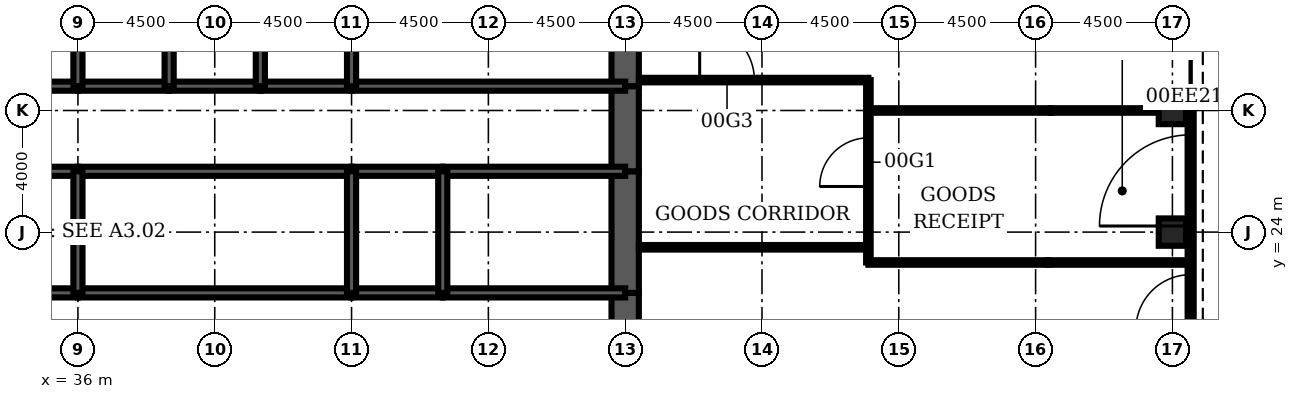
"""IFC4 building model, lengths in metres.
Left out: names, types, materials, properties, quantities, classifications, styles, units other than length and angle.
Written with IfcOpenShell. Run it as: python <this file> out.ifc"""

import sys

from ifc_helpers import new_model, si_unit, direction, frame, frame_2d, origin, origin_2d, place, context, subcontext, project, spatial, rectangle, hollow_rectangle, extrude, element, fill, save


model = new_model("IFC4")
c1 = context("Model", 3, precision=1e-05, world=origin(), true_north=direction((0.0, 1.0)))
c2 = subcontext(c1, "Body", "Model", "MODEL_VIEW")
j1 = project(units=[si_unit("LENGTHUNIT", "METRE"), si_unit("PLANEANGLEUNIT", "RADIAN")], contexts=[c1])
p1 = place(None, origin())
s1 = spatial("IfcSite", under=j1, at=p1, CompositionType="ELEMENT")
p2 = place(p1, origin())
s2 = spatial("IfcBuilding", under=s1, at=p2, CompositionType="ELEMENT")
p3 = place(p2, origin())
s3 = spatial("IfcBuildingStorey", under=s2, at=p3, CompositionType="ELEMENT", Elevation=0.0)
for number, where, z_axis, x_axis in (
    (1, (72.0, 24.0, 0.0), (0.0, 0.0, 1.0), (1.0, 0.0, 0.0)),
    (2, (72.0, 28.0, 0.0), (0.0, 0.0, 1.0), (1.0, 0.0, 0.0)),
):
    element("IfcColumn", number, at=place(p3, frame(where, z_axis=z_axis, x_axis=x_axis)), inside=s3, PredefinedType="COLUMN", context=c2, shape_type="SweptSolid", body=[
        extrude(hollow_rectangle(XDim=0.9, YDim=0.9, WallThickness=0.12, at=origin_2d()), origin(), (0.0, 0.0, 1.0), 6.0),
    ])
p4 = place(p3, frame((54.0, 19.2, 0.0), z_axis=(0.0, 0.0, 1.0), x_axis=(0.0, 1.0, 0.0)))
e3 = element("IfcWall", 3, at=p4, inside=s3, PredefinedType="SHEAR", context=c2, shape_type="SweptSolid", body=[
    extrude(rectangle(XDim=2.8, YDim=0.9, at=frame_2d((1.4, 0.0))), origin(), (0.0, 0.0, 1.0), 6.0),
])
p5 = place(p4, frame((0.4, 0.0, 0.0)))
e4 = element("IfcOpeningElement", 4, at=p5, cuts=e3, PredefinedType="OPENING", context=c2, shape_type="SweptSolid", body=[
    extrude(rectangle(XDim=1.8, YDim=2.1, at=frame_2d((0.9, 1.05))), frame((0.0, 0.46, 0.0), z_axis=(0.0, -1.0, 0.0), x_axis=(1.0, 0.0, 0.0)), (0.0, 0.0, 1.0), 0.92),
])
p6 = place(p3, frame((54.0, 22.0, 0.0), z_axis=(0.0, 0.0, 1.0), x_axis=(0.0, 1.0, 0.0)))
e5 = element("IfcWall", 5, at=p6, inside=s3, PredefinedType="SHEAR", context=c2, shape_type="SweptSolid", body=[
    extrude(rectangle(XDim=4.0, YDim=0.9, at=frame_2d((2.0, 0.0))), origin(), (0.0, 0.0, 1.0), 6.0),
])
p7 = place(p3, frame((54.0, 26.0, 0.0), z_axis=(0.0, 0.0, 1.0), x_axis=(0.0, 1.0, 0.0)))
e6 = element("IfcWall", 6, at=p7, inside=s3, PredefinedType="SHEAR", context=c2, shape_type="SweptSolid", body=[
    extrude(rectangle(XDim=2.8, YDim=0.9, at=frame_2d((1.4, 0.0))), origin(), (0.0, 0.0, 1.0), 6.0),
])
p8 = place(p7, frame((0.6, 0.0, 0.0)))
e7 = element("IfcOpeningElement", 7, at=p8, cuts=e6, PredefinedType="OPENING", context=c2, shape_type="SweptSolid", body=[
    extrude(rectangle(XDim=1.8, YDim=2.1, at=frame_2d((0.9, 1.05))), frame((0.0, 0.46, 0.0), z_axis=(0.0, -1.0, 0.0), x_axis=(1.0, 0.0, 0.0)), (0.0, 0.0, 1.0), 0.92),
])
p9 = place(p3, frame((54.0, 28.8, 0.0), z_axis=(0.0, 0.0, 1.0), x_axis=(0.0, 1.0, 0.0)))
e8 = element("IfcWall", 8, at=p9, inside=s3, PredefinedType="SHEAR", context=c2, shape_type="SweptSolid", body=[
    extrude(rectangle(XDim=3.2, YDim=0.9, at=frame_2d((1.6, 0.0))), origin(), (0.0, 0.0, 1.0), 6.0),
])
p10 = place(p3, frame((33.0, 28.8, 0.0), z_axis=(0.0, 0.0, 1.0), x_axis=(1.0, 0.0, 0.0)))
e9 = element("IfcWall", 9, at=p10, inside=s3, PredefinedType="SOLIDWALL", context=c2, shape_type="SweptSolid", body=[
    extrude(rectangle(XDim=3.0, YDim=0.3, at=frame_2d((1.5, 0.0))), origin(), (0.0, 0.0, 1.0), 6.0),
])
p11 = place(p10, frame((0.95, 0.0, 0.0)))
e10 = element("IfcOpeningElement", 10, at=p11, cuts=e9, PredefinedType="OPENING", context=c2, shape_type="SweptSolid", body=[
    extrude(rectangle(XDim=1.1, YDim=2.2, at=frame_2d((0.55, 1.1))), frame((0.0, 0.16, 0.0), z_axis=(0.0, -1.0, 0.0), x_axis=(1.0, 0.0, 0.0)), (0.0, 0.0, 1.0), 0.32),
])
p12 = place(p3, frame((36.0, 28.8, 0.0), z_axis=(0.0, 0.0, 1.0), x_axis=(1.0, 0.0, 0.0)))
e11 = element("IfcWall", 11, at=p12, inside=s3, PredefinedType="SOLIDWALL", context=c2, shape_type="SweptSolid", body=[
    extrude(rectangle(XDim=3.0, YDim=0.3, at=frame_2d((1.5, 0.0))), origin(), (0.0, 0.0, 1.0), 6.0),
])
p13 = place(p12, frame((0.95, 0.0, 0.0)))
e12 = element("IfcOpeningElement", 12, at=p13, cuts=e11, PredefinedType="OPENING", context=c2, shape_type="SweptSolid", body=[
    extrude(rectangle(XDim=1.1, YDim=2.2, at=frame_2d((0.55, 1.1))), frame((0.0, 0.16, 0.0), z_axis=(0.0, -1.0, 0.0), x_axis=(1.0, 0.0, 0.0)), (0.0, 0.0, 1.0), 0.32),
])
p14 = place(p3, frame((39.0, 28.8, 0.0), z_axis=(0.0, 0.0, 1.0), x_axis=(1.0, 0.0, 0.0)))
e13 = element("IfcWall", 13, at=p14, inside=s3, PredefinedType="SOLIDWALL", context=c2, shape_type="SweptSolid", body=[
    extrude(rectangle(XDim=3.0, YDim=0.3, at=frame_2d((1.5, 0.0))), origin(), (0.0, 0.0, 1.0), 6.0),
])
p15 = place(p14, frame((0.95, 0.0, 0.0)))
e14 = element("IfcOpeningElement", 14, at=p15, cuts=e13, PredefinedType="OPENING", context=c2, shape_type="SweptSolid", body=[
    extrude(rectangle(XDim=1.1, YDim=2.2, at=frame_2d((0.55, 1.1))), frame((0.0, 0.16, 0.0), z_axis=(0.0, -1.0, 0.0), x_axis=(1.0, 0.0, 0.0)), (0.0, 0.0, 1.0), 0.32),
])
p16 = place(p3, frame((42.0, 28.8, 0.0), z_axis=(0.0, 0.0, 1.0), x_axis=(1.0, 0.0, 0.0)))
e15 = element("IfcWall", 15, at=p16, inside=s3, PredefinedType="SOLIDWALL", context=c2, shape_type="SweptSolid", body=[
    extrude(rectangle(XDim=3.0, YDim=0.3, at=frame_2d((1.5, 0.0))), origin(), (0.0, 0.0, 1.0), 6.0),
])
p17 = place(p16, frame((0.95, 0.0, 0.0)))
e16 = element("IfcOpeningElement", 16, at=p17, cuts=e15, PredefinedType="OPENING", context=c2, shape_type="SweptSolid", body=[
    extrude(rectangle(XDim=1.1, YDim=2.2, at=frame_2d((0.55, 1.1))), frame((0.0, 0.16, 0.0), z_axis=(0.0, -1.0, 0.0), x_axis=(1.0, 0.0, 0.0)), (0.0, 0.0, 1.0), 0.32),
])
p18 = place(p3, frame((45.0, 28.8, 0.0), z_axis=(0.0, 0.0, 1.0), x_axis=(1.0, 0.0, 0.0)))
e17 = element("IfcWall", 17, at=p18, inside=s3, PredefinedType="SOLIDWALL", context=c2, shape_type="SweptSolid", body=[
    extrude(rectangle(XDim=9.0, YDim=0.3, at=frame_2d((4.5, 0.0))), origin(), (0.0, 0.0, 1.0), 6.0),
])
p19 = place(p18, frame((7.35, 0.0, 0.0)))
e18 = element("IfcOpeningElement", 18, at=p19, cuts=e17, PredefinedType="OPENING", context=c2, shape_type="SweptSolid", body=[
    extrude(rectangle(XDim=1.0, YDim=2.1, at=frame_2d((0.5, 1.05))), frame((0.0, 0.16, 0.0), z_axis=(0.0, -1.0, 0.0), x_axis=(1.0, 0.0, 0.0)), (0.0, 0.0, 1.0), 0.32),
])
p20 = place(p3, frame((27.0, 22.0, 0.0), z_axis=(0.0, 0.0, 1.0), x_axis=(1.0, 0.0, 0.0)))
e19 = element("IfcWall", 19, at=p20, inside=s3, PredefinedType="SOLIDWALL", context=c2, shape_type="SweptSolid", body=[
    extrude(rectangle(XDim=9.0, YDim=0.3, at=frame_2d((4.5, 0.0))), origin(), (0.0, 0.0, 1.0), 6.0),
])
p21 = place(p20, frame((4.0, 0.0, 0.0)))
e20 = element("IfcOpeningElement", 20, at=p21, cuts=e19, PredefinedType="OPENING", context=c2, shape_type="SweptSolid", body=[
    extrude(rectangle(XDim=1.0, YDim=2.1, at=frame_2d((0.5, 1.05))), frame((0.0, 0.16, 0.0), z_axis=(0.0, -1.0, 0.0), x_axis=(1.0, 0.0, 0.0)), (0.0, 0.0, 1.0), 0.32),
])
p22 = place(p3, frame((36.0, 22.0, 0.0), z_axis=(0.0, 0.0, 1.0), x_axis=(1.0, 0.0, 0.0)))
e21 = element("IfcWall", 21, at=p22, inside=s3, PredefinedType="SOLIDWALL", context=c2, shape_type="SweptSolid", body=[
    extrude(rectangle(XDim=9.0, YDim=0.3, at=frame_2d((4.5, 0.0))), origin(), (0.0, 0.0, 1.0), 6.0),
])
p23 = place(p22, frame((4.0, 0.0, 0.0)))
e22 = element("IfcOpeningElement", 22, at=p23, cuts=e21, PredefinedType="OPENING", context=c2, shape_type="SweptSolid", body=[
    extrude(rectangle(XDim=1.0, YDim=2.1, at=frame_2d((0.5, 1.05))), frame((0.0, 0.16, 0.0), z_axis=(0.0, -1.0, 0.0), x_axis=(1.0, 0.0, 0.0)), (0.0, 0.0, 1.0), 0.32),
])
p24 = place(p3, frame((45.0, 22.0, 0.0), z_axis=(0.0, 0.0, 1.0), x_axis=(1.0, 0.0, 0.0)))
e23 = element("IfcWall", 23, at=p24, inside=s3, PredefinedType="SOLIDWALL", context=c2, shape_type="SweptSolid", body=[
    extrude(rectangle(XDim=3.0, YDim=0.3, at=frame_2d((1.5, 0.0))), origin(), (0.0, 0.0, 1.0), 6.0),
])
p25 = place(p24, frame((1.0, 0.0, 0.0)))
e24 = element("IfcOpeningElement", 24, at=p25, cuts=e23, PredefinedType="OPENING", context=c2, shape_type="SweptSolid", body=[
    extrude(rectangle(XDim=1.0, YDim=2.1, at=frame_2d((0.5, 1.05))), frame((0.0, 0.16, 0.0), z_axis=(0.0, -1.0, 0.0), x_axis=(1.0, 0.0, 0.0)), (0.0, 0.0, 1.0), 0.32),
])
p26 = place(p3, frame((48.0, 22.0, 0.0), z_axis=(0.0, 0.0, 1.0), x_axis=(1.0, 0.0, 0.0)))
e25 = element("IfcWall", 25, at=p26, inside=s3, PredefinedType="SOLIDWALL", context=c2, shape_type="SweptSolid", body=[
    extrude(rectangle(XDim=6.0, YDim=0.3, at=frame_2d((3.0, 0.0))), origin(), (0.0, 0.0, 1.0), 6.0),
])
p27 = place(p26, frame((2.0, 0.0, 0.0)))
e26 = element("IfcOpeningElement", 26, at=p27, cuts=e25, PredefinedType="OPENING", context=c2, shape_type="SweptSolid", body=[
    extrude(rectangle(XDim=1.0, YDim=2.1, at=frame_2d((0.5, 1.05))), frame((0.0, 0.16, 0.0), z_axis=(0.0, -1.0, 0.0), x_axis=(1.0, 0.0, 0.0)), (0.0, 0.0, 1.0), 0.32),
])
p28 = place(p26, frame((4.3, 0.0, 0.0)))
e27 = element("IfcOpeningElement", 27, at=p28, cuts=e25, PredefinedType="OPENING", context=c2, shape_type="SweptSolid", body=[
    extrude(rectangle(XDim=1.0, YDim=2.1, at=frame_2d((0.5, 1.05))), frame((0.0, 0.16, 0.0), z_axis=(0.0, -1.0, 0.0), x_axis=(1.0, 0.0, 0.0)), (0.0, 0.0, 1.0), 0.32),
])
for number, where, z_axis, x_axis in (
    (28, (27.0, 26.0, 0.0), (0.0, 0.0, 1.0), (1.0, 0.0, 0.0)),
    (29, (36.0, 26.0, 0.0), (0.0, 0.0, 1.0), (1.0, 0.0, 0.0)),
):
    element("IfcWall", number, at=place(p3, frame(where, z_axis=z_axis, x_axis=x_axis)), inside=s3, PredefinedType="SOLIDWALL", context=c2, shape_type="SweptSolid", body=[
        extrude(rectangle(XDim=9.0, YDim=0.3, at=frame_2d((4.5, 0.0))), origin(), (0.0, 0.0, 1.0), 6.0),
    ])
p29 = place(p3, frame((45.0, 26.0, 0.0), z_axis=(0.0, 0.0, 1.0), x_axis=(1.0, 0.0, 0.0)))
e30 = element("IfcWall", 30, at=p29, inside=s3, PredefinedType="SOLIDWALL", context=c2, shape_type="SweptSolid", body=[
    extrude(rectangle(XDim=3.0, YDim=0.3, at=frame_2d((1.5, 0.0))), origin(), (0.0, 0.0, 1.0), 6.0),
])
p30 = place(p3, frame((48.0, 26.0, 0.0), z_axis=(0.0, 0.0, 1.0), x_axis=(1.0, 0.0, 0.0)))
e31 = element("IfcWall", 31, at=p30, inside=s3, PredefinedType="SOLIDWALL", context=c2, shape_type="SweptSolid", body=[
    extrude(rectangle(XDim=6.0, YDim=0.3, at=frame_2d((3.0, 0.0))), origin(), (0.0, 0.0, 1.0), 6.0),
])
for number, where, z_axis, x_axis in (
    (32, (36.0, 28.8, 0.0), (0.0, 0.0, 1.0), (0.0, 1.0, 0.0)),
    (33, (39.0, 28.8, 0.0), (0.0, 0.0, 1.0), (0.0, 1.0, 0.0)),
    (34, (42.0, 28.8, 0.0), (0.0, 0.0, 1.0), (0.0, 1.0, 0.0)),
    (35, (45.0, 28.8, 0.0), (0.0, 0.0, 1.0), (0.0, 1.0, 0.0)),
):
    element("IfcWall", number, at=place(p3, frame(where, z_axis=z_axis, x_axis=x_axis)), inside=s3, PredefinedType="SOLIDWALL", context=c2, shape_type="SweptSolid", body=[
        extrude(rectangle(XDim=3.2, YDim=0.3, at=frame_2d((1.6, 0.0))), origin(), (0.0, 0.0, 1.0), 6.0),
    ])
for number, where, z_axis, x_axis in (
    (36, (36.0, 22.0, 0.0), (0.0, 0.0, 1.0), (0.0, 1.0, 0.0)),
    (37, (45.0, 22.0, 0.0), (0.0, 0.0, 1.0), (0.0, 1.0, 0.0)),
    (38, (48.0, 22.0, 0.0), (0.0, 0.0, 1.0), (0.0, 1.0, 0.0)),
):
    element("IfcWall", number, at=place(p3, frame(where, z_axis=z_axis, x_axis=x_axis)), inside=s3, PredefinedType="SOLIDWALL", context=c2, shape_type="SweptSolid", body=[
        extrude(rectangle(XDim=4.0, YDim=0.3, at=frame_2d((2.0, 0.0))), origin(), (0.0, 0.0, 1.0), 6.0),
    ])
p31 = place(p3, frame((39.0, 22.15, 0.0), z_axis=(0.0, 0.0, 1.0), x_axis=(0.0, 1.0, 0.0)))
e39 = element("IfcWall", 39, at=p31, inside=s3, PredefinedType="PARTITIONING", context=c2, shape_type="SweptSolid", body=[
    extrude(rectangle(XDim=3.7, YDim=0.15, at=frame_2d((1.85, 0.0))), origin(), (0.0, 0.0, 1.0), 3.0),
])
p32 = place(p31, frame((2.2, 0.0, 0.0)))
e40 = element("IfcOpeningElement", 40, at=p32, cuts=e39, PredefinedType="OPENING", context=c2, shape_type="SweptSolid", body=[
    extrude(rectangle(XDim=1.0, YDim=2.1, at=frame_2d((0.5, 1.05))), frame((0.0, 0.085, 0.0), z_axis=(0.0, -1.0, 0.0), x_axis=(1.0, 0.0, 0.0)), (0.0, 0.0, 1.0), 0.17),
])
p33 = place(p3, frame((51.975, 22.15, 0.0), z_axis=(0.0, 0.0, 1.0), x_axis=(0.0, 1.0, 0.0)))
e41 = element("IfcWall", 41, at=p33, inside=s3, PredefinedType="PARTITIONING", context=c2, shape_type="SweptSolid", body=[
    extrude(rectangle(XDim=3.7, YDim=0.15, at=frame_2d((1.85, 0.0))), origin(), (0.0, 0.0, 1.0), 3.0),
])
p34 = place(p3, frame((67.9, 23.0, 0.0), z_axis=(0.0, 0.0, 1.0), x_axis=(1.0, 0.0, 0.0)))
e42 = element("IfcWall", 42, at=p34, inside=s3, PredefinedType="PARTITIONING", context=c2, shape_type="SweptSolid", body=[
    extrude(rectangle(XDim=4.6, YDim=0.15, at=frame_2d((2.3, 0.0))), origin(), (0.0, 0.0, 1.0), 3.0),
])
p35 = place(p3, frame((68.0, 28.0, 0.0), z_axis=(0.0, 0.0, 1.0), x_axis=(1.0, 0.0, 0.0)))
e43 = element("IfcWall", 43, at=p35, inside=s3, PredefinedType="PARTITIONING", context=c2, shape_type="SweptSolid", body=[
    extrude(rectangle(XDim=4.5, YDim=0.15, at=frame_2d((2.25, 0.0))), origin(), (0.0, 0.0, 1.0), 3.0),
])
p36 = place(p3, frame((62.0, 23.0, 0.0), z_axis=(0.0, 0.0, 1.0), x_axis=(1.0, 0.0, 0.0)))
e44 = element("IfcWall", 44, at=p36, inside=s3, PredefinedType="PARTITIONING", context=c2, shape_type="SweptSolid", body=[
    extrude(rectangle(XDim=5.9, YDim=0.15, at=frame_2d((2.95, 0.0))), origin(), (0.0, 0.0, 1.0), 3.0),
])
p37 = place(p3, frame((62.0, 23.0, 0.0), z_axis=(0.0, 0.0, 1.0), x_axis=(0.0, 1.0, 0.0)))
e45 = element("IfcWall", 45, at=p37, inside=s3, PredefinedType="PARTITIONING", context=c2, shape_type="SweptSolid", body=[
    extrude(rectangle(XDim=6.0, YDim=0.15, at=frame_2d((3.0, 0.0))), origin(), (0.0, 0.0, 1.0), 3.0),
])
p38 = place(p37, frame((2.5, 0.0, 0.0)))
e46 = element("IfcOpeningElement", 46, at=p38, cuts=e45, PredefinedType="OPENING", context=c2, shape_type="SweptSolid", body=[
    extrude(rectangle(XDim=1.6, YDim=2.1, at=frame_2d((0.8, 1.05))), frame((0.0, 0.085, 0.0), z_axis=(0.0, -1.0, 0.0), x_axis=(1.0, 0.0, 0.0)), (0.0, 0.0, 1.0), 0.17),
])
p39 = place(p3, frame((62.0, 28.0, 0.0), z_axis=(0.0, 0.0, 1.0), x_axis=(1.0, 0.0, 0.0)))
e47 = element("IfcWall", 47, at=p39, inside=s3, PredefinedType="PARTITIONING", context=c2, shape_type="SweptSolid", body=[
    extrude(rectangle(XDim=6.0, YDim=0.15, at=frame_2d((3.0, 0.0))), origin(), (0.0, 0.0, 1.0), 3.0),
])
p40 = place(p3, frame((54.45, 29.0, 0.0), z_axis=(0.0, 0.0, 1.0), x_axis=(1.0, 0.0, 0.0)))
e48 = element("IfcWall", 48, at=p40, inside=s3, PredefinedType="PARTITIONING", context=c2, shape_type="SweptSolid", body=[
    extrude(rectangle(XDim=7.55, YDim=0.15, at=frame_2d((3.775, 0.0))), origin(), (0.0, 0.0, 1.0), 3.0),
])
p41 = place(p40, frame((2.0, 0.0, 0.0)))
e49 = element("IfcOpeningElement", 49, at=p41, cuts=e48, PredefinedType="OPENING", context=c2, shape_type="SweptSolid", body=[
    extrude(rectangle(XDim=1.8, YDim=2.1, at=frame_2d((0.9, 1.05))), frame((0.0, 0.085, 0.0), z_axis=(0.0, -1.0, 0.0), x_axis=(1.0, 0.0, 0.0)), (0.0, 0.0, 1.0), 0.17),
])
p42 = place(p3, frame((54.45, 23.5, 0.0), z_axis=(0.0, 0.0, 1.0), x_axis=(1.0, 0.0, 0.0)))
e50 = element("IfcWall", 50, at=p42, inside=s3, PredefinedType="PARTITIONING", context=c2, shape_type="SweptSolid", body=[
    extrude(rectangle(XDim=7.55, YDim=0.15, at=frame_2d((3.775, 0.0))), origin(), (0.0, 0.0, 1.0), 3.0),
])
p43 = place(p3, frame((72.6, 20.0, 0.0), z_axis=(0.0, 0.0, 1.0), x_axis=(0.0, 1.0, 0.0)))
e51 = element("IfcWall", 51, at=p43, inside=s3, PredefinedType="USERDEFINED", context=c2, shape_type="SweptSolid", body=[
    extrude(rectangle(XDim=8.0, YDim=0.2, at=frame_2d((4.0, 0.0))), origin(), (0.0, 0.0, 1.0), 5.82),
])
p44 = place(p43, frame((0.8, 0.0, 0.0)))
e52 = element("IfcOpeningElement", 52, at=p44, cuts=e51, PredefinedType="OPENING", context=c2, shape_type="SweptSolid", body=[
    extrude(rectangle(XDim=1.8, YDim=2.4, at=frame_2d((0.9, 1.2))), frame((0.0, 0.11, 0.0), z_axis=(0.0, -1.0, 0.0), x_axis=(1.0, 0.0, 0.0)), (0.0, 0.0, 1.0), 0.22),
])
p45 = place(p43, frame((4.2, 0.0, 0.0)))
e53 = element("IfcOpeningElement", 53, at=p45, cuts=e51, PredefinedType="OPENING", context=c2, shape_type="SweptSolid", body=[
    extrude(rectangle(XDim=3.0, YDim=3.5, at=frame_2d((1.5, 1.75))), frame((0.0, 0.11, 0.0), z_axis=(0.0, -1.0, 0.0), x_axis=(1.0, 0.0, 0.0)), (0.0, 0.0, 1.0), 0.22),
])
p46 = place(p32, origin())
e54 = element("IfcDoor", 54, at=p46, inside=s3, OperationType="SINGLE_SWING_RIGHT", PredefinedType="DOOR", context=c2, shape_type="SweptSolid", body=[
    extrude(rectangle(XDim=1.0, YDim=2.1, at=frame_2d((0.5, 1.05))), frame((0.0, 0.025, 0.0), z_axis=(0.0, -1.0, 0.0), x_axis=(1.0, 0.0, 0.0)), (0.0, 0.0, 1.0), 0.05),
])
fill(e40, e54)
p47 = place(p38, origin())
e55 = element("IfcDoor", 55, at=p47, inside=s3, OperationType="SINGLE_SWING_LEFT", PredefinedType="DOOR", context=c2, shape_type="SweptSolid", body=[
    extrude(rectangle(XDim=1.6, YDim=2.1, at=frame_2d((0.8, 1.05))), frame((0.0, 0.025, 0.0), z_axis=(0.0, -1.0, 0.0), x_axis=(1.0, 0.0, 0.0)), (0.0, 0.0, 1.0), 0.05),
])
fill(e46, e55)
p48 = place(p41, origin())
e56 = element("IfcDoor", 56, at=p48, inside=s3, OperationType="SINGLE_SWING_LEFT", PredefinedType="DOOR", context=c2, shape_type="SweptSolid", body=[
    extrude(rectangle(XDim=1.8, YDim=2.1, at=frame_2d((0.9, 1.05))), frame((0.0, 0.025, 0.0), z_axis=(0.0, -1.0, 0.0), x_axis=(1.0, 0.0, 0.0)), (0.0, 0.0, 1.0), 0.05),
])
fill(e49, e56)
p49 = place(p44, origin())
e57 = element("IfcDoor", 57, at=p49, inside=s3, OperationType="SINGLE_SWING_LEFT", PredefinedType="DOOR", context=c2, shape_type="SweptSolid", body=[
    extrude(rectangle(XDim=1.8, YDim=2.4, at=frame_2d((0.9, 1.2))), frame((0.0, 0.025, 0.0), z_axis=(0.0, -1.0, 0.0), x_axis=(1.0, 0.0, 0.0)), (0.0, 0.0, 1.0), 0.05),
])
fill(e52, e57)
p50 = place(p45, origin())
e58 = element("IfcDoor", 58, at=p50, inside=s3, OperationType="SINGLE_SWING_LEFT", PredefinedType="USERDEFINED", context=c2, shape_type="SweptSolid", body=[
    extrude(rectangle(XDim=3.0, YDim=3.5, at=frame_2d((1.5, 1.75))), frame((0.0, 0.025, 0.0), z_axis=(0.0, -1.0, 0.0), x_axis=(1.0, 0.0, 0.0)), (0.0, 0.0, 1.0), 0.05),
])
fill(e53, e58)
p51 = place(p17, origin())
e59 = element("IfcDoor", 59, at=p51, inside=s3, OperationType="DOUBLE_DOOR_SLIDING", PredefinedType="USERDEFINED", context=c2, shape_type="SweptSolid", body=[
    extrude(rectangle(XDim=1.1, YDim=2.2, at=frame_2d((0.55, 1.1))), frame((0.0, 0.025, 0.0), z_axis=(0.0, -1.0, 0.0), x_axis=(1.0, 0.0, 0.0)), (0.0, 0.0, 1.0), 0.05),
])
fill(e16, e59)
p52 = place(p13, origin())
e60 = element("IfcDoor", 60, at=p52, inside=s3, OperationType="DOUBLE_DOOR_SLIDING", PredefinedType="USERDEFINED", context=c2, shape_type="SweptSolid", body=[
    extrude(rectangle(XDim=1.1, YDim=2.2, at=frame_2d((0.55, 1.1))), frame((0.0, 0.025, 0.0), z_axis=(0.0, -1.0, 0.0), x_axis=(1.0, 0.0, 0.0)), (0.0, 0.0, 1.0), 0.05),
])
fill(e12, e60)
p53 = place(p15, origin())
e61 = element("IfcDoor", 61, at=p53, inside=s3, OperationType="DOUBLE_DOOR_SLIDING", PredefinedType="USERDEFINED", context=c2, shape_type="SweptSolid", body=[
    extrude(rectangle(XDim=1.1, YDim=2.2, at=frame_2d((0.55, 1.1))), frame((0.0, 0.025, 0.0), z_axis=(0.0, -1.0, 0.0), x_axis=(1.0, 0.0, 0.0)), (0.0, 0.0, 1.0), 0.05),
])
fill(e14, e61)
p54 = place(p19, origin())
e62 = element("IfcDoor", 62, at=p54, inside=s3, OperationType="SINGLE_SWING_RIGHT", PredefinedType="DOOR", context=c2, shape_type="SweptSolid", body=[
    extrude(rectangle(XDim=1.0, YDim=2.1, at=frame_2d((0.5, 1.05))), frame((0.0, 0.025, 0.0), z_axis=(0.0, -1.0, 0.0), x_axis=(1.0, 0.0, 0.0)), (0.0, 0.0, 1.0), 0.05),
])
fill(e18, e62)
p55 = place(p5, origin())
e63 = element("IfcDoor", 63, at=p55, inside=s3, OperationType="SINGLE_SWING_LEFT", PredefinedType="DOOR", context=c2, shape_type="SweptSolid", body=[
    extrude(rectangle(XDim=1.8, YDim=2.1, at=frame_2d((0.9, 1.05))), frame((0.0, 0.45, 0.0), z_axis=(0.0, -1.0, 0.0), x_axis=(1.0, 0.0, 0.0)), (0.0, 0.0, 1.0), 0.899),
])
fill(e4, e63)
p56 = place(p8, origin())
e64 = element("IfcDoor", 64, at=p56, inside=s3, OperationType="SINGLE_SWING_LEFT", PredefinedType="DOOR", context=c2, shape_type="SweptSolid", body=[
    extrude(rectangle(XDim=1.8, YDim=2.1, at=frame_2d((0.9, 1.05))), frame((0.0, 0.45, 0.0), z_axis=(0.0, -1.0, 0.0), x_axis=(1.0, 0.0, 0.0)), (0.0, 0.0, 1.0), 0.899),
])
fill(e7, e64)
p57 = place(p23, origin())
e65 = element("IfcDoor", 65, at=p57, inside=s3, OperationType="SINGLE_SWING_LEFT", PredefinedType="DOOR", context=c2, shape_type="SweptSolid", body=[
    extrude(rectangle(XDim=1.0, YDim=2.1, at=frame_2d((0.5, 1.05))), frame((0.0, 0.025, 0.0), z_axis=(0.0, -1.0, 0.0), x_axis=(1.0, 0.0, 0.0)), (0.0, 0.0, 1.0), 0.05),
])
fill(e22, e65)
p58 = place(p25, origin())
e66 = element("IfcDoor", 66, at=p58, inside=s3, OperationType="SINGLE_SWING_LEFT", PredefinedType="DOOR", context=c2, shape_type="SweptSolid", body=[
    extrude(rectangle(XDim=1.0, YDim=2.1, at=frame_2d((0.5, 1.05))), frame((0.0, 0.025, 0.0), z_axis=(0.0, -1.0, 0.0), x_axis=(1.0, 0.0, 0.0)), (0.0, 0.0, 1.0), 0.05),
])
fill(e24, e66)
p59 = place(p27, origin())
e67 = element("IfcDoor", 67, at=p59, inside=s3, OperationType="SINGLE_SWING_LEFT", PredefinedType="DOOR", context=c2, shape_type="SweptSolid", body=[
    extrude(rectangle(XDim=1.0, YDim=2.1, at=frame_2d((0.5, 1.05))), frame((0.0, 0.025, 0.0), z_axis=(0.0, -1.0, 0.0), x_axis=(1.0, 0.0, 0.0)), (0.0, 0.0, 1.0), 0.05),
])
fill(e26, e67)
p60 = place(p28, origin())
e68 = element("IfcDoor", 68, at=p60, inside=s3, OperationType="SINGLE_SWING_RIGHT", PredefinedType="DOOR", context=c2, shape_type="SweptSolid", body=[
    extrude(rectangle(XDim=1.0, YDim=2.1, at=frame_2d((0.5, 1.05))), frame((0.0, 0.025, 0.0), z_axis=(0.0, -1.0, 0.0), x_axis=(1.0, 0.0, 0.0)), (0.0, 0.0, 1.0), 0.05),
])
fill(e27, e68)
save(model, sys.argv[1])
